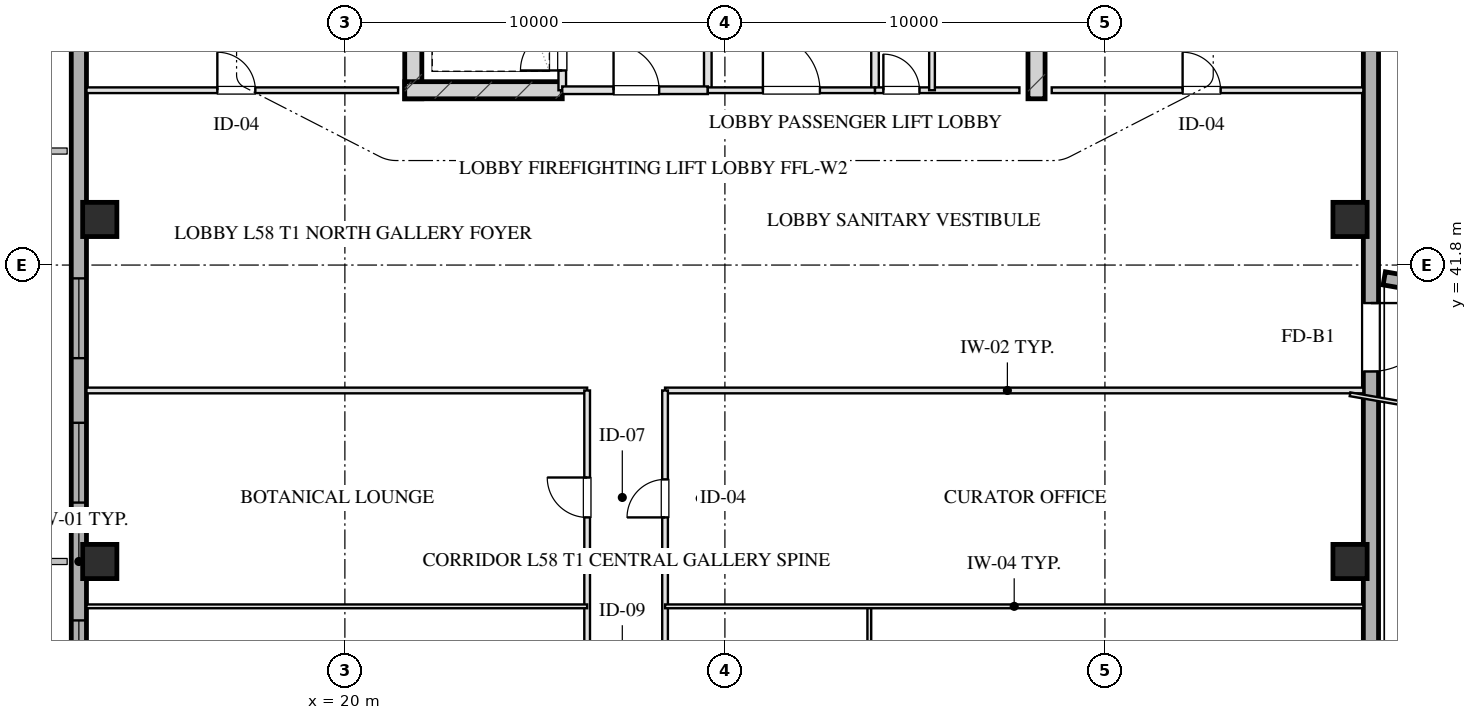
"""IFC4 building model, lengths in metres.
Left out: names, types, materials, properties, quantities, classifications, styles, units other than length and angle.
Written with IfcOpenShell. Run it as: python <this file> out.ifc"""

import sys

from ifc_helpers import new_model, si_unit, direction, frame, frame_2d, origin, origin_2d, place, context, subcontext, project, spatial, rectangle, hollow_rectangle, extrude, element, fill, save


model = new_model("IFC4")
c1 = context("Model", 3, precision=1e-05, world=origin(), true_north=direction((0.0, 1.0)))
c2 = subcontext(c1, "Body", "Model", "MODEL_VIEW")
j1 = project(units=[si_unit("LENGTHUNIT", "METRE"), si_unit("PLANEANGLEUNIT", "RADIAN")], contexts=[c1])
p1 = place(None, origin())
s1 = spatial("IfcSite", under=j1, at=p1, CompositionType="ELEMENT")
p2 = place(p1, origin())
s2 = spatial("IfcBuilding", under=s1, at=p2, CompositionType="ELEMENT")
p3 = place(p2, frame((0.0, 0.0, 216.2)))
s3 = spatial("IfcBuildingStorey", under=s2, at=p3, CompositionType="ELEMENT", Elevation=216.2)
for number, where, z_axis, x_axis in (
    (1, (21.8, 46.175, 0.0), (0.0, 0.0, 1.0), (0.0, 1.0, 0.0)),
    (2, (38.2, 46.175, 0.0), (0.0, 0.0, 1.0), (0.0, 1.0, 0.0)),
):
    element("IfcWall", number, at=place(p3, frame(where, z_axis=z_axis, x_axis=x_axis)), inside=s3, PredefinedType="SHEAR", context=c2, shape_type="SweptSolid", body=[
        extrude(rectangle(XDim=9.33, YDim=0.45, at=frame_2d((4.665, 0.0))), origin(), (0.0, 0.0, 1.0), 3.45),
    ])
p4 = place(p3, frame((21.575, 46.4, 0.0), z_axis=(0.0, 0.0, 1.0), x_axis=(1.0, 0.0, 0.0)))
e3 = element("IfcWall", 3, at=p4, inside=s3, PredefinedType="SHEAR", context=c2, shape_type="SweptSolid", body=[
    extrude(rectangle(XDim=4.145, YDim=0.45, at=frame_2d((2.073, 0.0))), origin(), (0.0, 0.0, 1.0), 3.45),
])
for number, where, z_axis, x_axis in (
    (4, (13.55, 34.0, 0.0), (0.0, 0.0, 1.0), (1.0, 0.0, 0.0)),
    (5, (13.55, 43.0, 0.0), (0.0, 0.0, 1.0), (1.0, 0.0, 0.0)),
    (6, (46.45, 34.0, 0.0), (0.0, 0.0, 1.0), (1.0, 0.0, 0.0)),
    (7, (46.45, 43.0, 0.0), (0.0, 0.0, 1.0), (1.0, 0.0, 0.0)),
):
    element("IfcColumn", number, at=place(p3, frame(where, z_axis=z_axis, x_axis=x_axis)), inside=s3, PredefinedType="COLUMN", context=c2, shape_type="SweptSolid", body=[
        extrude(hollow_rectangle(XDim=0.9, YDim=0.9, WallThickness=0.032, at=origin_2d()), origin(), (0.0, 0.0, 1.0), 3.451),
    ])
p5 = place(p3, frame((13.0, 10.8, 0.0), z_axis=(0.0, 0.0, 1.0), x_axis=(0.0, 1.0, 0.0)))
e8 = element("IfcWall", 8, at=p5, inside=s3, PredefinedType="SOLIDWALL", context=c2, shape_type="SweptSolid", body=[
    extrude(rectangle(XDim=46.4, YDim=0.4, at=frame_2d((23.2, 0.0))), origin(), (0.0, 0.0, 1.0), 2.55),
])
p6 = place(p5, frame((15.75, 0.0, 0.75)))
e9 = element("IfcOpeningElement", 9, at=p6, cuts=e8, PredefinedType="OPENING", context=c2, shape_type="SweptSolid", body=[
    extrude(rectangle(XDim=2.1, YDim=1.4, at=frame_2d((1.05, 0.7))), frame((0.0, 0.21, 0.0), z_axis=(0.0, -1.0, 0.0), x_axis=(1.0, 0.0, 0.0)), (0.0, 0.0, 1.0), 0.42),
])
p7 = place(p5, frame((19.55, 0.0, 0.75)))
e10 = element("IfcOpeningElement", 10, at=p7, cuts=e8, PredefinedType="OPENING", context=c2, shape_type="SweptSolid", body=[
    extrude(rectangle(XDim=2.1, YDim=1.4, at=frame_2d((1.05, 0.7))), frame((0.0, 0.21, 0.0), z_axis=(0.0, -1.0, 0.0), x_axis=(1.0, 0.0, 0.0)), (0.0, 0.0, 1.0), 0.42),
])
p8 = place(p5, frame((24.75, 0.0, 0.75)))
e11 = element("IfcOpeningElement", 11, at=p8, cuts=e8, PredefinedType="OPENING", context=c2, shape_type="SweptSolid", body=[
    extrude(rectangle(XDim=2.1, YDim=1.4, at=frame_2d((1.05, 0.7))), frame((0.0, 0.21, 0.0), z_axis=(0.0, -1.0, 0.0), x_axis=(1.0, 0.0, 0.0)), (0.0, 0.0, 1.0), 0.42),
])
p9 = place(p5, frame((28.55, 0.0, 0.75)))
e12 = element("IfcOpeningElement", 12, at=p9, cuts=e8, PredefinedType="OPENING", context=c2, shape_type="SweptSolid", body=[
    extrude(rectangle(XDim=2.1, YDim=1.4, at=frame_2d((1.05, 0.7))), frame((0.0, 0.21, 0.0), z_axis=(0.0, -1.0, 0.0), x_axis=(1.0, 0.0, 0.0)), (0.0, 0.0, 1.0), 0.42),
])
p10 = place(p3, frame((47.0, 57.2, 0.0), z_axis=(0.0, 0.0, 1.0), x_axis=(0.0, -1.0, 0.0)))
e13 = element("IfcWall", 13, at=p10, inside=s3, PredefinedType="SOLIDWALL", context=c2, shape_type="SweptSolid", body=[
    extrude(rectangle(XDim=46.4, YDim=0.4, at=frame_2d((23.2, 0.0))), origin(), (0.0, 0.0, 1.0), 2.55),
])
p11 = place(p10, frame((16.4, 0.0, 0.0)))
e14 = element("IfcOpeningElement", 14, at=p11, cuts=e13, PredefinedType="OPENING", context=c2, shape_type="SweptSolid", body=[
    extrude(rectangle(XDim=1.8, YDim=2.2, at=frame_2d((0.9, 1.1))), frame((0.0, 0.21, 0.0), z_axis=(0.0, -1.0, 0.0), x_axis=(1.0, 0.0, 0.0)), (0.0, 0.0, 1.0), 0.42),
])
p12 = place(p3, frame((74.177, 36.745, 0.0), z_axis=(0.0, 0.0, 1.0), x_axis=(-0.984966283934, 0.172746691759, 0.0)))
e15 = element("IfcWall", 15, at=p12, inside=s3, PredefinedType="SOLIDWALL", context=c2, shape_type="SweptSolid", body=[
    extrude(rectangle(XDim=27.237, YDim=0.35, at=frame_2d((13.618, 0.0))), origin(), (0.0, 0.0, 1.0), 3.15),
])
p13 = place(p3, frame((25.72, 46.4, 0.0), z_axis=(0.0, 0.0, 1.0), x_axis=(0.0, 1.0, 0.0)))
e16 = element("IfcWall", 16, at=p13, inside=s3, PredefinedType="PARTITIONING", context=c2, shape_type="SweptSolid", body=[
    extrude(rectangle(XDim=1.9, YDim=0.2, at=frame_2d((0.95, 0.0))), origin(), (0.0, 0.0, 1.0), 3.155),
])
p14 = place(p13, frame((0.52, 0.0, 0.0)))
e17 = element("IfcOpeningElement", 17, at=p14, cuts=e16, PredefinedType="OPENING", context=c2, shape_type="SweptSolid", body=[
    extrude(rectangle(XDim=1.1, YDim=2.05, at=frame_2d((0.55, 1.025))), frame((0.0, 0.11, 0.0), z_axis=(0.0, -1.0, 0.0), x_axis=(1.0, 0.0, 0.0)), (0.0, 0.0, 1.0), 0.22),
])
p15 = place(p3, frame((29.55, 46.4, 0.0), z_axis=(0.0, 0.0, 1.0), x_axis=(0.0, 1.0, 0.0)))
e18 = element("IfcWall", 18, at=p15, inside=s3, PredefinedType="PARTITIONING", context=c2, shape_type="SweptSolid", body=[
    extrude(rectangle(XDim=8.43, YDim=0.2, at=frame_2d((4.215, 0.0))), origin(), (0.0, 0.0, 1.0), 3.155),
])
p16 = place(p15, frame((5.95, 0.0, 0.0)))
e19 = element("IfcOpeningElement", 19, at=p16, cuts=e18, PredefinedType="OPENING", context=c2, shape_type="SweptSolid", body=[
    extrude(rectangle(XDim=0.9, YDim=2.05, at=frame_2d((0.45, 1.025))), frame((0.0, 0.11, 0.0), z_axis=(0.0, -1.0, 0.0), x_axis=(1.0, 0.0, 0.0)), (0.0, 0.0, 1.0), 0.22),
])
p17 = place(p3, frame((25.72, 46.4, 0.0), z_axis=(0.0, 0.0, 1.0), x_axis=(1.0, 0.0, 0.0)))
e20 = element("IfcWall", 20, at=p17, inside=s3, PredefinedType="PARTITIONING", context=c2, shape_type="SweptSolid", body=[
    extrude(rectangle(XDim=3.83, YDim=0.2, at=frame_2d((1.915, 0.0))), origin(), (0.0, 0.0, 1.0), 3.155),
])
p18 = place(p17, frame((1.35, 0.0, 0.0)))
e21 = element("IfcOpeningElement", 21, at=p18, cuts=e20, PredefinedType="OPENING", context=c2, shape_type="SweptSolid", body=[
    extrude(rectangle(XDim=1.2, YDim=2.05, at=frame_2d((0.6, 1.025))), frame((0.0, 0.11, 0.0), z_axis=(0.0, -1.0, 0.0), x_axis=(1.0, 0.0, 0.0)), (0.0, 0.0, 1.0), 0.22),
])
p19 = place(p3, frame((33.95, 46.4, 0.0), z_axis=(0.0, 0.0, 1.0), x_axis=(0.0, 1.0, 0.0)))
e22 = element("IfcWall", 22, at=p19, inside=s3, PredefinedType="PARTITIONING", context=c2, shape_type="SweptSolid", body=[
    extrude(rectangle(XDim=8.43, YDim=0.2, at=frame_2d((4.215, 0.0))), origin(), (0.0, 0.0, 1.0), 3.155),
])
p20 = place(p3, frame((29.55, 46.4, 0.0), z_axis=(0.0, 0.0, 1.0), x_axis=(1.0, 0.0, 0.0)))
e23 = element("IfcWall", 23, at=p20, inside=s3, PredefinedType="PARTITIONING", context=c2, shape_type="SweptSolid", body=[
    extrude(rectangle(XDim=4.4, YDim=0.15, at=frame_2d((2.2, 0.0))), origin(), (0.0, 0.0, 1.0), 3.155),
])
p21 = place(p20, frame((1.45, 0.0, 0.0)))
e24 = element("IfcOpeningElement", 24, at=p21, cuts=e23, PredefinedType="OPENING", context=c2, shape_type="SweptSolid", body=[
    extrude(rectangle(XDim=1.5, YDim=2.05, at=frame_2d((0.75, 1.025))), frame((0.0, 0.085, 0.0), z_axis=(0.0, -1.0, 0.0), x_axis=(1.0, 0.0, 0.0)), (0.0, 0.0, 1.0), 0.17),
])
p22 = place(p3, frame((33.95, 46.4, 0.0), z_axis=(0.0, 0.0, 1.0), x_axis=(1.0, 0.0, 0.0)))
e25 = element("IfcWall", 25, at=p22, inside=s3, PredefinedType="PARTITIONING", context=c2, shape_type="SweptSolid", body=[
    extrude(rectangle(XDim=3.8, YDim=0.15, at=frame_2d((1.9, 0.0))), origin(), (0.0, 0.0, 1.0), 3.155),
])
p23 = place(p22, frame((0.22, 0.0, 0.0)))
e26 = element("IfcOpeningElement", 26, at=p23, cuts=e25, PredefinedType="OPENING", context=c2, shape_type="SweptSolid", body=[
    extrude(rectangle(XDim=0.95, YDim=2.05, at=frame_2d((0.475, 1.025))), frame((0.0, 0.085, 0.0), z_axis=(0.0, -1.0, 0.0), x_axis=(1.0, 0.0, 0.0)), (0.0, 0.0, 1.0), 0.17),
])
p24 = place(p3, frame((35.45, 46.4, 0.0), z_axis=(0.0, 0.0, 1.0), x_axis=(0.0, 1.0, 0.0)))
e27 = element("IfcWall", 27, at=p24, inside=s3, PredefinedType="PARTITIONING", context=c2, shape_type="SweptSolid", body=[
    extrude(rectangle(XDim=8.43, YDim=0.15, at=frame_2d((4.215, 0.0))), origin(), (0.0, 0.0, 1.0), 2.745),
])
p25 = place(p24, frame((2.55, 0.0, 0.0)))
e28 = element("IfcOpeningElement", 28, at=p25, cuts=e27, PredefinedType="OPENING", context=c2, shape_type="SweptSolid", body=[
    extrude(rectangle(XDim=0.95, YDim=2.05, at=frame_2d((0.475, 1.025))), frame((0.0, 0.085, 0.0), z_axis=(0.0, -1.0, 0.0), x_axis=(1.0, 0.0, 0.0)), (0.0, 0.0, 1.0), 0.17),
])
p26 = place(p24, frame((4.7, 0.0, 0.0)))
e29 = element("IfcOpeningElement", 29, at=p26, cuts=e27, PredefinedType="OPENING", context=c2, shape_type="SweptSolid", body=[
    extrude(rectangle(XDim=0.9, YDim=2.05, at=frame_2d((0.45, 1.025))), frame((0.0, 0.085, 0.0), z_axis=(0.0, -1.0, 0.0), x_axis=(1.0, 0.0, 0.0)), (0.0, 0.0, 1.0), 0.17),
])
p27 = place(p24, frame((6.8, 0.0, 0.0)))
e30 = element("IfcOpeningElement", 30, at=p27, cuts=e27, PredefinedType="OPENING", context=c2, shape_type="SweptSolid", body=[
    extrude(rectangle(XDim=0.9, YDim=2.05, at=frame_2d((0.45, 1.025))), frame((0.0, 0.085, 0.0), z_axis=(0.0, -1.0, 0.0), x_axis=(1.0, 0.0, 0.0)), (0.0, 0.0, 1.0), 0.17),
])
p28 = place(p3, frame((13.2, 46.4, 0.0), z_axis=(0.0, 0.0, 1.0), x_axis=(1.0, 0.0, 0.0)))
e31 = element("IfcWall", 31, at=p28, inside=s3, PredefinedType="PARTITIONING", context=c2, shape_type="SweptSolid", body=[
    extrude(rectangle(XDim=8.2, YDim=0.15, at=frame_2d((4.1, 0.0))), origin(), (0.0, 0.0, 1.0), 3.155),
])
p29 = place(p28, frame((3.444, 0.0, 0.0)))
e32 = element("IfcOpeningElement", 32, at=p29, cuts=e31, PredefinedType="OPENING", context=c2, shape_type="SweptSolid", body=[
    extrude(rectangle(XDim=1.0, YDim=2.05, at=frame_2d((0.5, 1.025))), frame((0.0, 0.085, 0.0), z_axis=(0.0, -1.0, 0.0), x_axis=(1.0, 0.0, 0.0)), (0.0, 0.0, 1.0), 0.17),
])
p30 = place(p3, frame((38.6, 46.4, 0.0), z_axis=(0.0, 0.0, 1.0), x_axis=(1.0, 0.0, 0.0)))
e33 = element("IfcWall", 33, at=p30, inside=s3, PredefinedType="PARTITIONING", context=c2, shape_type="SweptSolid", body=[
    extrude(rectangle(XDim=8.2, YDim=0.15, at=frame_2d((4.1, 0.0))), origin(), (0.0, 0.0, 1.0), 3.155),
])
p31 = place(p30, frame((3.444, 0.0, 0.0)))
e34 = element("IfcOpeningElement", 34, at=p31, cuts=e33, PredefinedType="OPENING", context=c2, shape_type="SweptSolid", body=[
    extrude(rectangle(XDim=1.0, YDim=2.05, at=frame_2d((0.5, 1.025))), frame((0.0, 0.085, 0.0), z_axis=(0.0, -1.0, 0.0), x_axis=(1.0, 0.0, 0.0)), (0.0, 0.0, 1.0), 0.17),
])
p32 = place(p3, frame((13.2, 38.5, 0.0), z_axis=(0.0, 0.0, 1.0), x_axis=(1.0, 0.0, 0.0)))
e35 = element("IfcWall", 35, at=p32, inside=s3, PredefinedType="PARTITIONING", context=c2, shape_type="SweptSolid", body=[
    extrude(rectangle(XDim=13.175, YDim=0.15, at=frame_2d((6.587, 0.0))), origin(), (0.0, 0.0, 1.0), 3.155),
])
p33 = place(p3, frame((28.425, 38.5, 0.0), z_axis=(0.0, 0.0, 1.0), x_axis=(1.0, 0.0, 0.0)))
e36 = element("IfcWall", 36, at=p33, inside=s3, PredefinedType="PARTITIONING", context=c2, shape_type="SweptSolid", body=[
    extrude(rectangle(XDim=18.375, YDim=0.15, at=frame_2d((9.188, 0.0))), origin(), (0.0, 0.0, 1.0), 3.155),
])
p34 = place(p3, frame((26.375, 29.5, 0.0), z_axis=(0.0, 0.0, 1.0), x_axis=(0.0, 1.0, 0.0)))
e37 = element("IfcWall", 37, at=p34, inside=s3, PredefinedType="PARTITIONING", context=c2, shape_type="SweptSolid", body=[
    extrude(rectangle(XDim=9.0, YDim=0.15, at=frame_2d((4.5, 0.0))), origin(), (0.0, 0.0, 1.0), 3.155),
])
p35 = place(p34, frame((1.16, 0.0, 0.0)))
e38 = element("IfcOpeningElement", 38, at=p35, cuts=e37, PredefinedType="OPENING", context=c2, shape_type="SweptSolid", body=[
    extrude(rectangle(XDim=0.85, YDim=2.05, at=frame_2d((0.425, 1.025))), frame((0.0, 0.085, 0.0), z_axis=(0.0, -1.0, 0.0), x_axis=(1.0, 0.0, 0.0)), (0.0, 0.0, 1.0), 0.17),
])
p36 = place(p34, frame((5.66, 0.0, 0.0)))
e39 = element("IfcOpeningElement", 39, at=p36, cuts=e37, PredefinedType="OPENING", context=c2, shape_type="SweptSolid", body=[
    extrude(rectangle(XDim=1.05, YDim=2.05, at=frame_2d((0.525, 1.025))), frame((0.0, 0.085, 0.0), z_axis=(0.0, -1.0, 0.0), x_axis=(1.0, 0.0, 0.0)), (0.0, 0.0, 1.0), 0.17),
])
p37 = place(p3, frame((28.425, 29.5, 0.0), z_axis=(0.0, 0.0, 1.0), x_axis=(0.0, 1.0, 0.0)))
e40 = element("IfcWall", 40, at=p37, inside=s3, PredefinedType="PARTITIONING", context=c2, shape_type="SweptSolid", body=[
    extrude(rectangle(XDim=9.0, YDim=0.15, at=frame_2d((4.5, 0.0))), origin(), (0.0, 0.0, 1.0), 3.155),
])
p38 = place(p37, frame((1.16, 0.0, 0.0)))
e41 = element("IfcOpeningElement", 41, at=p38, cuts=e40, PredefinedType="OPENING", context=c2, shape_type="SweptSolid", body=[
    extrude(rectangle(XDim=1.0, YDim=2.05, at=frame_2d((0.5, 1.025))), frame((0.0, 0.085, 0.0), z_axis=(0.0, -1.0, 0.0), x_axis=(1.0, 0.0, 0.0)), (0.0, 0.0, 1.0), 0.17),
])
p39 = place(p37, frame((5.66, 0.0, 0.0)))
e42 = element("IfcOpeningElement", 42, at=p39, cuts=e40, PredefinedType="OPENING", context=c2, shape_type="SweptSolid", body=[
    extrude(rectangle(XDim=1.0, YDim=2.05, at=frame_2d((0.5, 1.025))), frame((0.0, 0.085, 0.0), z_axis=(0.0, -1.0, 0.0), x_axis=(1.0, 0.0, 0.0)), (0.0, 0.0, 1.0), 0.17),
])
p40 = place(p3, frame((13.2, 32.82, 0.0), z_axis=(0.0, 0.0, 1.0), x_axis=(1.0, 0.0, 0.0)))
e43 = element("IfcWall", 43, at=p40, inside=s3, PredefinedType="MOVABLE", context=c2, shape_type="SweptSolid", body=[
    extrude(rectangle(XDim=13.175, YDim=0.1, at=frame_2d((6.587, 0.0))), origin(), (0.0, 0.0, 1.0), 3.155),
])
p41 = place(p3, frame((33.8, 29.5, 0.0), z_axis=(0.0, 0.0, 1.0), x_axis=(0.0, 1.0, 0.0)))
e44 = element("IfcWall", 44, at=p41, inside=s3, PredefinedType="MOVABLE", context=c2, shape_type="SweptSolid", body=[
    extrude(rectangle(XDim=3.32, YDim=0.1, at=frame_2d((1.66, 0.0))), origin(), (0.0, 0.0, 1.0), 3.155),
])
p42 = place(p3, frame((28.425, 32.82, 0.0), z_axis=(0.0, 0.0, 1.0), x_axis=(1.0, 0.0, 0.0)))
e45 = element("IfcWall", 45, at=p42, inside=s3, PredefinedType="MOVABLE", context=c2, shape_type="SweptSolid", body=[
    extrude(rectangle(XDim=18.375, YDim=0.1, at=frame_2d((9.188, 0.0))), origin(), (0.0, 0.0, 1.0), 3.155),
])
p43 = place(p3, frame((46.45, 38.4, 0.0), z_axis=(0.0, 0.0, 1.0), x_axis=(0.985202712742, -0.171393158571, 0.0)))
e46 = element("IfcWall", 46, at=p43, inside=s3, PredefinedType="MOVABLE", context=c2, shape_type="SweptSolid", body=[
    extrude(rectangle(XDim=28.144, YDim=0.1, at=frame_2d((14.072, 0.0))), origin(), (0.0, 0.0, 1.0), 3.155),
])
p44 = place(p43, frame((6.2, 0.0, 0.0)))
e47 = element("IfcOpeningElement", 47, at=p44, cuts=e46, PredefinedType="OPENING", context=c2, shape_type="SweptSolid", body=[
    extrude(rectangle(XDim=1.2, YDim=2.05, at=frame_2d((0.6, 1.025))), frame((0.0, 0.06, 0.0), z_axis=(0.0, -1.0, 0.0), x_axis=(1.0, 0.0, 0.0)), (0.0, 0.0, 1.0), 0.12),
])
p45 = place(p43, frame((18.5, 0.0, 0.0)))
e48 = element("IfcOpeningElement", 48, at=p45, cuts=e46, PredefinedType="OPENING", context=c2, shape_type="SweptSolid", body=[
    extrude(rectangle(XDim=1.2, YDim=2.05, at=frame_2d((0.6, 1.025))), frame((0.0, 0.06, 0.0), z_axis=(0.0, -1.0, 0.0), x_axis=(1.0, 0.0, 0.0)), (0.0, 0.0, 1.0), 0.12),
])
p46 = place(p7, origin())
e49 = element("IfcWindow", 49, at=p46, inside=s3, PartitioningType="TRIPLE_PANEL_VERTICAL", PredefinedType="WINDOW", context=c2, shape_type="SweptSolid", body=[
    extrude(rectangle(XDim=2.1, YDim=1.4, at=frame_2d((1.05, 0.7))), frame((0.0, 0.03, 0.0), z_axis=(0.0, -1.0, 0.0), x_axis=(1.0, 0.0, 0.0)), (0.0, 0.0, 1.0), 0.06),
])
fill(e10, e49)
p47 = place(p8, origin())
e50 = element("IfcWindow", 50, at=p47, inside=s3, PartitioningType="TRIPLE_PANEL_VERTICAL", PredefinedType="WINDOW", context=c2, shape_type="SweptSolid", body=[
    extrude(rectangle(XDim=2.1, YDim=1.4, at=frame_2d((1.05, 0.7))), frame((0.0, 0.03, 0.0), z_axis=(0.0, -1.0, 0.0), x_axis=(1.0, 0.0, 0.0)), (0.0, 0.0, 1.0), 0.06),
])
fill(e11, e50)
p48 = place(p9, origin())
e51 = element("IfcWindow", 51, at=p48, inside=s3, PartitioningType="TRIPLE_PANEL_VERTICAL", PredefinedType="WINDOW", context=c2, shape_type="SweptSolid", body=[
    extrude(rectangle(XDim=2.1, YDim=1.4, at=frame_2d((1.05, 0.7))), frame((0.0, 0.03, 0.0), z_axis=(0.0, -1.0, 0.0), x_axis=(1.0, 0.0, 0.0)), (0.0, 0.0, 1.0), 0.06),
])
fill(e12, e51)
p49 = place(p11, origin())
e52 = element("IfcDoor", 52, at=p49, inside=s3, OperationType="SINGLE_SWING_LEFT", PredefinedType="DOOR", context=c2, shape_type="SweptSolid", body=[
    extrude(rectangle(XDim=1.8, YDim=2.2, at=frame_2d((0.9, 1.1))), frame((0.0, 0.025, 0.0), z_axis=(0.0, -1.0, 0.0), x_axis=(1.0, 0.0, 0.0)), (0.0, 0.0, 1.0), 0.05),
])
fill(e14, e52)
p50 = place(p14, origin())
e53 = element("IfcDoor", 53, at=p50, inside=s3, OperationType="SINGLE_SWING_LEFT", PredefinedType="DOOR", context=c2, shape_type="SweptSolid", body=[
    extrude(rectangle(XDim=1.1, YDim=2.05, at=frame_2d((0.55, 1.025))), frame((0.0, 0.025, 0.0), z_axis=(0.0, -1.0, 0.0), x_axis=(1.0, 0.0, 0.0)), (0.0, 0.0, 1.0), 0.05),
])
fill(e17, e53)
p51 = place(p18, origin())
e54 = element("IfcDoor", 54, at=p51, inside=s3, OperationType="SINGLE_SWING_LEFT", PredefinedType="DOOR", context=c2, shape_type="SweptSolid", body=[
    extrude(rectangle(XDim=1.2, YDim=2.05, at=frame_2d((0.6, 1.025))), frame((0.0, 0.025, 0.0), z_axis=(0.0, -1.0, 0.0), x_axis=(1.0, 0.0, 0.0)), (0.0, 0.0, 1.0), 0.05),
])
fill(e21, e54)
p52 = place(p21, origin())
e55 = element("IfcDoor", 55, at=p52, inside=s3, OperationType="SINGLE_SWING_LEFT", PredefinedType="DOOR", context=c2, shape_type="SweptSolid", body=[
    extrude(rectangle(XDim=1.5, YDim=2.05, at=frame_2d((0.75, 1.025))), frame((0.0, 0.025, 0.0), z_axis=(0.0, -1.0, 0.0), x_axis=(1.0, 0.0, 0.0)), (0.0, 0.0, 1.0), 0.05),
])
fill(e24, e55)
p53 = place(p23, origin())
e56 = element("IfcDoor", 56, at=p53, inside=s3, OperationType="SINGLE_SWING_LEFT", PredefinedType="DOOR", context=c2, shape_type="SweptSolid", body=[
    extrude(rectangle(XDim=0.95, YDim=2.05, at=frame_2d((0.475, 1.025))), frame((0.0, 0.025, 0.0), z_axis=(0.0, -1.0, 0.0), x_axis=(1.0, 0.0, 0.0)), (0.0, 0.0, 1.0), 0.05),
])
fill(e26, e56)
p54 = place(p29, origin())
e57 = element("IfcDoor", 57, at=p54, inside=s3, OperationType="SINGLE_SWING_LEFT", PredefinedType="DOOR", context=c2, shape_type="SweptSolid", body=[
    extrude(rectangle(XDim=1.0, YDim=2.05, at=frame_2d((0.5, 1.025))), frame((0.0, 0.025, 0.0), z_axis=(0.0, -1.0, 0.0), x_axis=(1.0, 0.0, 0.0)), (0.0, 0.0, 1.0), 0.05),
])
fill(e32, e57)
p55 = place(p31, origin())
e58 = element("IfcDoor", 58, at=p55, inside=s3, OperationType="SINGLE_SWING_LEFT", PredefinedType="DOOR", context=c2, shape_type="SweptSolid", body=[
    extrude(rectangle(XDim=1.0, YDim=2.05, at=frame_2d((0.5, 1.025))), frame((0.0, 0.025, 0.0), z_axis=(0.0, -1.0, 0.0), x_axis=(1.0, 0.0, 0.0)), (0.0, 0.0, 1.0), 0.05),
])
fill(e34, e58)
p56 = place(p36, origin())
e59 = element("IfcDoor", 59, at=p56, inside=s3, OperationType="SINGLE_SWING_RIGHT", PredefinedType="DOOR", context=c2, shape_type="SweptSolid", body=[
    extrude(rectangle(XDim=1.05, YDim=2.05, at=frame_2d((0.525, 1.025))), frame((0.0, 0.025, 0.0), z_axis=(0.0, -1.0, 0.0), x_axis=(1.0, 0.0, 0.0)), (0.0, 0.0, 1.0), 0.05),
])
fill(e39, e59)
p57 = place(p39, origin())
e60 = element("IfcDoor", 60, at=p57, inside=s3, OperationType="SINGLE_SWING_LEFT", PredefinedType="DOOR", context=c2, shape_type="SweptSolid", body=[
    extrude(rectangle(XDim=1.0, YDim=2.05, at=frame_2d((0.5, 1.025))), frame((0.0, 0.025, 0.0), z_axis=(0.0, -1.0, 0.0), x_axis=(1.0, 0.0, 0.0)), (0.0, 0.0, 1.0), 0.05),
])
fill(e42, e60)
save(model, sys.argv[1])
